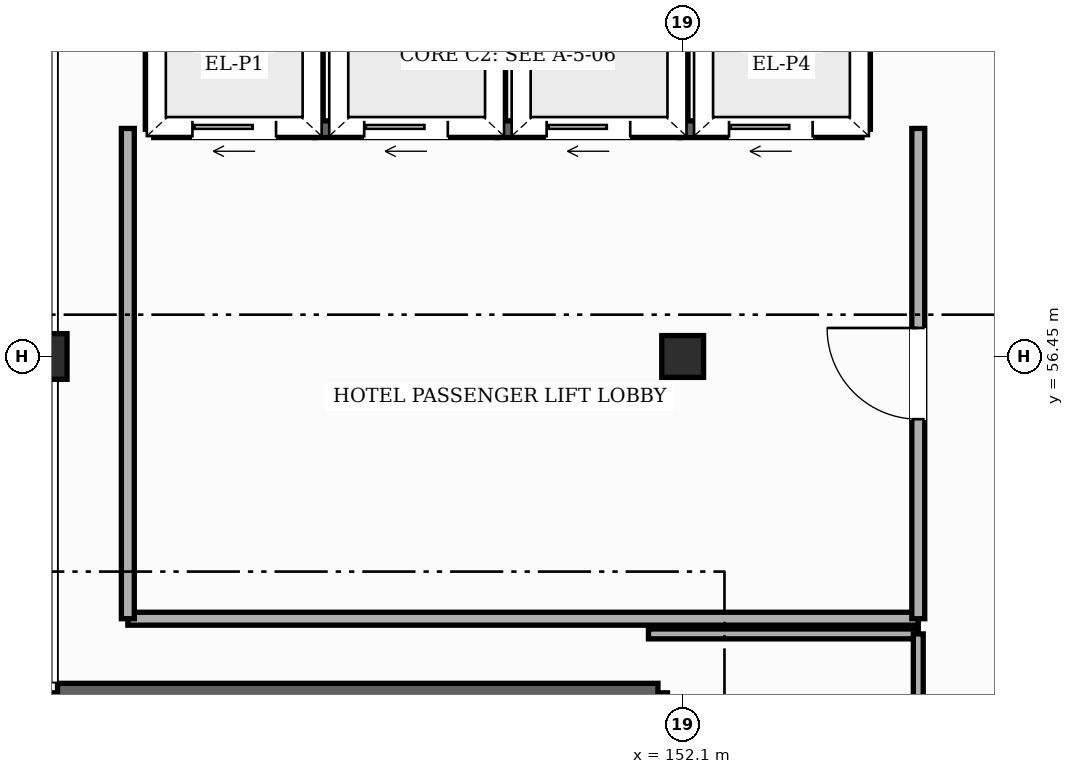
"""IFC4 building model, lengths in metres.
Left out: names, types, materials, properties, quantities, classifications, styles, units other than length and angle.
Written with IfcOpenShell. Run it as: python <this file> out.ifc"""

import sys

from ifc_helpers import new_model, si_unit, direction, frame, frame_2d, origin, origin_2d, place, context, subcontext, project, spatial, rectangle, hollow_rectangle, extrude, element, fill, save


model = new_model("IFC4")
c1 = context("Model", 3, precision=1e-05, world=origin(), true_north=direction((0.0, 1.0)))
c2 = subcontext(c1, "Body", "Model", "MODEL_VIEW")
j1 = project(units=[si_unit("LENGTHUNIT", "METRE"), si_unit("PLANEANGLEUNIT", "RADIAN")], contexts=[c1])
p1 = place(None, origin())
s1 = spatial("IfcSite", under=j1, at=p1, CompositionType="ELEMENT")
p2 = place(p1, origin())
s2 = spatial("IfcBuilding", under=s1, at=p2, CompositionType="ELEMENT")
p3 = place(p2, frame((0.0, 0.0, 31.8)))
s3 = spatial("IfcBuildingStorey", under=s2, at=p3, CompositionType="ELEMENT", Elevation=31.8)
p4 = place(p3, frame((143.7, 56.45, 0.0), z_axis=(0.0, 0.0, 1.0), x_axis=(1.0, 0.0, 0.0)))
e1 = element("IfcColumn", 1, at=p4, inside=s3, PredefinedType="COLUMN", context=c2, shape_type="SweptSolid", body=[
    extrude(hollow_rectangle(XDim=0.6, YDim=0.6, WallThickness=0.025, InnerFilletRadius=0.025, OuterFilletRadius=0.05, at=origin_2d()), origin(), (0.0, 0.0, 1.0), 3.6),
])
p5 = place(p3, frame((152.1, 56.45, 0.0), z_axis=(0.0, 0.0, 1.0), x_axis=(1.0, 0.0, 0.0)))
e2 = element("IfcColumn", 2, at=p5, inside=s3, PredefinedType="COLUMN", context=c2, shape_type="SweptSolid", body=[
    extrude(hollow_rectangle(XDim=0.55, YDim=0.55, WallThickness=0.022, InnerFilletRadius=0.022, OuterFilletRadius=0.044, at=origin_2d()), origin(), (0.0, 0.0, 1.0), 3.6),
])
for number, where, z_axis, x_axis in (
    (3, (143.875, 48.675, 0.0), (0.0, 0.0, 1.0), (0.0, 1.0, 0.0)),
    (4, (151.775, 52.025, 0.0), (0.0, 0.0, 1.0), (0.0, -1.0, 0.0)),
):
    element("IfcWall", number, at=place(p3, frame(where, z_axis=z_axis, x_axis=x_axis)), inside=s3, PredefinedType="SHEAR", context=c2, shape_type="SweptSolid", body=[
        extrude(rectangle(XDim=3.35, YDim=0.25, at=frame_2d((1.675, 0.0))), origin(), (0.0, 0.0, 1.0), 3.38),
    ])
p6 = place(p3, frame((143.875, 52.025, 0.0), z_axis=(0.0, 0.0, 1.0), x_axis=(1.0, 0.0, 0.0)))
e5 = element("IfcWall", 5, at=p6, inside=s3, PredefinedType="SHEAR", context=c2, shape_type="SweptSolid", body=[
    extrude(rectangle(XDim=7.9, YDim=0.25, at=frame_2d((3.95, 0.0))), origin(), (0.0, 0.0, 1.0), 3.38),
])
p7 = place(p3, frame((145.14, 59.44, 0.0), z_axis=(0.0, 0.0, 1.0), x_axis=(1.0, 0.0, 0.0)))
e6 = element("IfcWall", 6, at=p7, inside=s3, PredefinedType="SHEAR", context=c2, shape_type="SweptSolid", body=[
    extrude(rectangle(XDim=2.12, YDim=0.22, at=frame_2d((1.06, 0.0))), origin(), (0.0, 0.0, 1.0), 3.38),
])
p8 = place(p7, frame((0.51, 0.0, 0.0)))
e7 = element("IfcOpeningElement", 7, at=p8, cuts=e6, PredefinedType="OPENING", context=c2, shape_type="SweptSolid", body=[
    extrude(rectangle(XDim=1.1, YDim=2.2, at=frame_2d((0.55, 1.1))), frame((0.0, 0.12, 0.0), z_axis=(0.0, -1.0, 0.0), x_axis=(1.0, 0.0, 0.0)), (0.0, 0.0, 1.0), 0.24),
])
for number, where, z_axis, x_axis in (
    (8, (147.26, 59.44, 0.0), (0.0, 0.0, 1.0), (0.0, 1.0, 0.0)),
    (9, (145.14, 59.44, 0.0), (0.0, 0.0, 1.0), (0.0, 1.0, 0.0)),
):
    element("IfcWall", number, at=place(p3, frame(where, z_axis=z_axis, x_axis=x_axis)), inside=s3, PredefinedType="SHEAR", context=c2, shape_type="SweptSolid", body=[
        extrude(rectangle(XDim=1.92, YDim=0.22, at=frame_2d((0.96, 0.0))), origin(), (0.0, 0.0, 1.0), 3.38),
    ])
p9 = place(p3, frame((147.26, 59.44, 0.0), z_axis=(0.0, 0.0, 1.0), x_axis=(1.0, 0.0, 0.0)))
e10 = element("IfcWall", 10, at=p9, inside=s3, PredefinedType="SHEAR", context=c2, shape_type="SweptSolid", body=[
    extrude(rectangle(XDim=2.4, YDim=0.22, at=frame_2d((1.2, 0.0))), origin(), (0.0, 0.0, 1.0), 3.38),
])
p10 = place(p9, frame((0.65, 0.0, 0.0)))
e11 = element("IfcOpeningElement", 11, at=p10, cuts=e10, PredefinedType="OPENING", context=c2, shape_type="SweptSolid", body=[
    extrude(rectangle(XDim=1.1, YDim=2.2, at=frame_2d((0.55, 1.1))), frame((0.0, 0.12, 0.0), z_axis=(0.0, -1.0, 0.0), x_axis=(1.0, 0.0, 0.0)), (0.0, 0.0, 1.0), 0.24),
])
p11 = place(p3, frame((149.66, 59.44, 0.0), z_axis=(0.0, 0.0, 1.0), x_axis=(0.0, 1.0, 0.0)))
e12 = element("IfcWall", 12, at=p11, inside=s3, PredefinedType="SHEAR", context=c2, shape_type="SweptSolid", body=[
    extrude(rectangle(XDim=1.92, YDim=0.22, at=frame_2d((0.96, 0.0))), origin(), (0.0, 0.0, 1.0), 3.38),
])
p12 = place(p3, frame((149.66, 59.44, 0.0), z_axis=(0.0, 0.0, 1.0), x_axis=(1.0, 0.0, 0.0)))
e13 = element("IfcWall", 13, at=p12, inside=s3, PredefinedType="SHEAR", context=c2, shape_type="SweptSolid", body=[
    extrude(rectangle(XDim=2.4, YDim=0.22, at=frame_2d((1.2, 0.0))), origin(), (0.0, 0.0, 1.0), 3.38),
])
p13 = place(p12, frame((0.65, 0.0, 0.0)))
e14 = element("IfcOpeningElement", 14, at=p13, cuts=e13, PredefinedType="OPENING", context=c2, shape_type="SweptSolid", body=[
    extrude(rectangle(XDim=1.1, YDim=2.2, at=frame_2d((0.55, 1.1))), frame((0.0, 0.12, 0.0), z_axis=(0.0, -1.0, 0.0), x_axis=(1.0, 0.0, 0.0)), (0.0, 0.0, 1.0), 0.24),
])
p14 = place(p3, frame((152.06, 59.44, 0.0), z_axis=(0.0, 0.0, 1.0), x_axis=(0.0, 1.0, 0.0)))
e15 = element("IfcWall", 15, at=p14, inside=s3, PredefinedType="SHEAR", context=c2, shape_type="SweptSolid", body=[
    extrude(rectangle(XDim=1.92, YDim=0.22, at=frame_2d((0.96, 0.0))), origin(), (0.0, 0.0, 1.0), 3.38),
])
p15 = place(p3, frame((152.06, 59.44, 0.0), z_axis=(0.0, 0.0, 1.0), x_axis=(1.0, 0.0, 0.0)))
e16 = element("IfcWall", 16, at=p15, inside=s3, PredefinedType="SHEAR", context=c2, shape_type="SweptSolid", body=[
    extrude(rectangle(XDim=2.4, YDim=0.22, at=frame_2d((1.2, 0.0))), origin(), (0.0, 0.0, 1.0), 3.38),
])
p16 = place(p15, frame((0.65, 0.0, 0.0)))
e17 = element("IfcOpeningElement", 17, at=p16, cuts=e16, PredefinedType="OPENING", context=c2, shape_type="SweptSolid", body=[
    extrude(rectangle(XDim=1.1, YDim=2.2, at=frame_2d((0.55, 1.1))), frame((0.0, 0.12, 0.0), z_axis=(0.0, -1.0, 0.0), x_axis=(1.0, 0.0, 0.0)), (0.0, 0.0, 1.0), 0.24),
])
p17 = place(p3, frame((154.46, 59.44, 0.0), z_axis=(0.0, 0.0, 1.0), x_axis=(0.0, 1.0, 0.0)))
e18 = element("IfcWall", 18, at=p17, inside=s3, PredefinedType="SHEAR", context=c2, shape_type="SweptSolid", body=[
    extrude(rectangle(XDim=1.92, YDim=0.22, at=frame_2d((0.96, 0.0))), origin(), (0.0, 0.0, 1.0), 3.38),
])
p18 = place(p3, frame((151.65, 52.8, 0.0), z_axis=(0.0, 0.0, 1.0), x_axis=(1.0, 0.0, 0.0)))
e19 = element("IfcWall", 19, at=p18, inside=s3, PredefinedType="PARTITIONING", context=c2, shape_type="SweptSolid", body=[
    extrude(rectangle(XDim=3.55, YDim=0.13, at=frame_2d((1.775, 0.0))), origin(), (0.0, 0.0, 1.0), 3.365),
])
p19 = place(p3, frame((144.8, 53.0, 0.0), z_axis=(0.0, 0.0, 1.0), x_axis=(1.0, 0.0, 0.0)))
e20 = element("IfcWall", 20, at=p19, inside=s3, PredefinedType="PARTITIONING", context=c2, shape_type="SweptSolid", body=[
    extrude(rectangle(XDim=10.4, YDim=0.17, at=frame_2d((5.2, 0.0))), origin(), (0.0, 0.0, 1.0), 3.365),
])
p20 = place(p3, frame((144.8, 53.0, 0.0), z_axis=(0.0, 0.0, 1.0), x_axis=(0.0, 1.0, 0.0)))
e21 = element("IfcWall", 21, at=p20, inside=s3, PredefinedType="PARTITIONING", context=c2, shape_type="SweptSolid", body=[
    extrude(rectangle(XDim=6.45, YDim=0.17, at=frame_2d((3.225, 0.0))), origin(), (0.0, 0.0, 1.0), 3.365),
])
p21 = place(p3, frame((155.2, 48.8, 0.0), z_axis=(0.0, 0.0, 1.0), x_axis=(0.0, 1.0, 0.0)))
e22 = element("IfcWall", 22, at=p21, inside=s3, PredefinedType="PARTITIONING", context=c2, shape_type="SweptSolid", body=[
    extrude(rectangle(XDim=4.0, YDim=0.13, at=frame_2d((2.0, 0.0))), origin(), (0.0, 0.0, 1.0), 3.365),
])
p22 = place(p21, frame((1.5, 0.0, 0.0)))
e23 = element("IfcOpeningElement", 23, at=p22, cuts=e22, PredefinedType="OPENING", context=c2, shape_type="SweptSolid", body=[
    extrude(rectangle(XDim=1.0, YDim=2.18, at=frame_2d((0.5, 1.09))), frame((0.0, 0.075, 0.0), z_axis=(0.0, -1.0, 0.0), x_axis=(1.0, 0.0, 0.0)), (0.0, 0.0, 1.0), 0.15),
])
p23 = place(p3, frame((155.2, 53.0, 0.0), z_axis=(0.0, 0.0, 1.0), x_axis=(0.0, 1.0, 0.0)))
e24 = element("IfcWall", 24, at=p23, inside=s3, PredefinedType="PARTITIONING", context=c2, shape_type="SweptSolid", body=[
    extrude(rectangle(XDim=6.45, YDim=0.17, at=frame_2d((3.225, 0.0))), origin(), (0.0, 0.0, 1.0), 3.365),
])
p24 = place(p23, frame((2.625, 0.0, 0.0)))
e25 = element("IfcOpeningElement", 25, at=p24, cuts=e24, PredefinedType="OPENING", context=c2, shape_type="SweptSolid", body=[
    extrude(rectangle(XDim=1.2, YDim=2.2, at=frame_2d((0.6, 1.1))), frame((0.0, 0.095, 0.0), z_axis=(0.0, -1.0, 0.0), x_axis=(1.0, 0.0, 0.0)), (0.0, 0.0, 1.0), 0.19),
])
p25 = place(p8, origin())
e26 = element("IfcDoor", 26, at=p25, inside=s3, OperationType="SLIDING_TO_LEFT", PredefinedType="DOOR", context=c2, shape_type="SweptSolid", body=[
    extrude(rectangle(XDim=1.1, YDim=2.2, at=frame_2d((0.55, 1.1))), frame((0.0, 0.025, 0.0), z_axis=(0.0, -1.0, 0.0), x_axis=(1.0, 0.0, 0.0)), (0.0, 0.0, 1.0), 0.05),
])
fill(e7, e26)
p26 = place(p10, origin())
e27 = element("IfcDoor", 27, at=p26, inside=s3, OperationType="SLIDING_TO_LEFT", PredefinedType="DOOR", context=c2, shape_type="SweptSolid", body=[
    extrude(rectangle(XDim=1.1, YDim=2.2, at=frame_2d((0.55, 1.1))), frame((0.0, 0.025, 0.0), z_axis=(0.0, -1.0, 0.0), x_axis=(1.0, 0.0, 0.0)), (0.0, 0.0, 1.0), 0.05),
])
fill(e11, e27)
p27 = place(p13, origin())
e28 = element("IfcDoor", 28, at=p27, inside=s3, OperationType="SLIDING_TO_LEFT", PredefinedType="DOOR", context=c2, shape_type="SweptSolid", body=[
    extrude(rectangle(XDim=1.1, YDim=2.2, at=frame_2d((0.55, 1.1))), frame((0.0, 0.025, 0.0), z_axis=(0.0, -1.0, 0.0), x_axis=(1.0, 0.0, 0.0)), (0.0, 0.0, 1.0), 0.05),
])
fill(e14, e28)
p28 = place(p16, origin())
e29 = element("IfcDoor", 29, at=p28, inside=s3, OperationType="SLIDING_TO_LEFT", PredefinedType="DOOR", context=c2, shape_type="SweptSolid", body=[
    extrude(rectangle(XDim=1.1, YDim=2.2, at=frame_2d((0.55, 1.1))), frame((0.0, 0.025, 0.0), z_axis=(0.0, -1.0, 0.0), x_axis=(1.0, 0.0, 0.0)), (0.0, 0.0, 1.0), 0.05),
])
fill(e17, e29)
p29 = place(p24, origin())
e30 = element("IfcDoor", 30, at=p29, inside=s3, OperationType="SINGLE_SWING_RIGHT", PredefinedType="DOOR", context=c2, shape_type="SweptSolid", body=[
    extrude(rectangle(XDim=1.2, YDim=2.2, at=frame_2d((0.6, 1.1))), frame((0.0, 0.025, 0.0), z_axis=(0.0, -1.0, 0.0), x_axis=(1.0, 0.0, 0.0)), (0.0, 0.0, 1.0), 0.05),
])
fill(e25, e30)
save(model, sys.argv[1])
